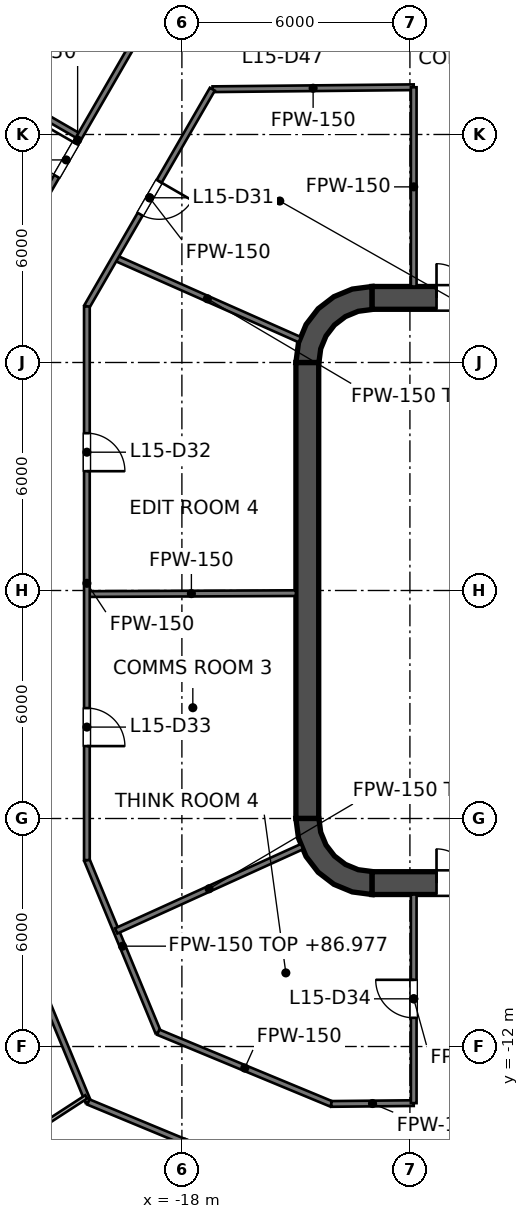
"""IFC4 building model, lengths in metres.
Left out: names, types, materials, properties, quantities, classifications, styles, units other than length and angle.
Written with IfcOpenShell. Run it as: python <this file> out.ifc"""

import sys

from ifc_helpers import new_model, si_unit, direction, frame, frame_2d, origin, place, context, subcontext, project, spatial, polyline, rectangle, outline, extrude, element, fill, save


model = new_model("IFC4")
c1 = context("Model", 3, precision=1e-05, world=origin(), true_north=direction((0.0, 1.0)))
c2 = subcontext(c1, "Body", "Model", "MODEL_VIEW")
j1 = project(units=[si_unit("LENGTHUNIT", "METRE"), si_unit("PLANEANGLEUNIT", "RADIAN")], contexts=[c1])
p1 = place(None, origin())
s1 = spatial("IfcSite", under=j1, at=p1, CompositionType="ELEMENT")
p2 = place(p1, origin())
s2 = spatial("IfcBuilding", under=s1, at=p2, CompositionType="ELEMENT")
p3 = place(p2, frame((0.0, 0.0, 84.0)))
s3 = spatial("IfcBuildingStorey", under=s2, at=p3, CompositionType="ELEMENT", Elevation=84.0)
p4 = place(p3, frame((-13.0, 7.7, 0.0), z_axis=(0.0, 0.0, 1.0), x_axis=(1.0, 0.0, 0.0)))
e1 = element("IfcWall", 1, at=p4, inside=s3, PredefinedType="SHEAR", context=c2, shape_type="SweptSolid", body=[
    extrude(rectangle(XDim=26.0, YDim=0.6, at=frame_2d((13.0, 0.0))), origin(), (0.0, 0.0, 1.0), 4.2),
])
p5 = place(p4, frame((1.7, 0.0, 0.0)))
e2 = element("IfcOpeningElement", 2, at=p5, cuts=e1, PredefinedType="OPENING", context=c2, shape_type="SweptSolid", body=[
    extrude(rectangle(XDim=1.8, YDim=2.1, at=frame_2d((0.9, 1.05))), frame((0.0, 0.3, 0.0), z_axis=(0.0, -1.0, 0.0), x_axis=(1.0, 0.0, 0.0)), (0.0, 0.0, 1.0), 0.6),
])
p6 = place(p4, frame((22.5, 0.0, 0.0)))
e3 = element("IfcOpeningElement", 3, at=p6, cuts=e1, PredefinedType="OPENING", context=c2, shape_type="SweptSolid", body=[
    extrude(rectangle(XDim=1.8, YDim=2.1, at=frame_2d((0.9, 1.05))), frame((0.0, 0.3, 0.0), z_axis=(0.0, -1.0, 0.0), x_axis=(1.0, 0.0, 0.0)), (0.0, 0.0, 1.0), 0.6),
])
p7 = place(p3, frame((-13.0, -7.7, 0.0), z_axis=(0.0, 0.0, 1.0), x_axis=(1.0, 0.0, 0.0)))
e4 = element("IfcWall", 4, at=p7, inside=s3, PredefinedType="SHEAR", context=c2, shape_type="SweptSolid", body=[
    extrude(rectangle(XDim=26.0, YDim=0.6, at=frame_2d((13.0, 0.0))), origin(), (0.0, 0.0, 1.0), 4.2),
])
p8 = place(p7, frame((1.7, 0.0, 0.0)))
e5 = element("IfcOpeningElement", 5, at=p8, cuts=e4, PredefinedType="OPENING", context=c2, shape_type="SweptSolid", body=[
    extrude(rectangle(XDim=1.8, YDim=2.1, at=frame_2d((0.9, 1.05))), frame((0.0, 0.3, 0.0), z_axis=(0.0, -1.0, 0.0), x_axis=(1.0, 0.0, 0.0)), (0.0, 0.0, 1.0), 0.6),
])
p9 = place(p7, frame((22.5, 0.0, 0.0)))
e6 = element("IfcOpeningElement", 6, at=p9, cuts=e4, PredefinedType="OPENING", context=c2, shape_type="SweptSolid", body=[
    extrude(rectangle(XDim=1.8, YDim=2.1, at=frame_2d((0.9, 1.05))), frame((0.0, 0.3, 0.0), z_axis=(0.0, -1.0, 0.0), x_axis=(1.0, 0.0, 0.0)), (0.0, 0.0, 1.0), 0.6),
])
p10 = place(p3, frame((-14.7, -6.0, 0.0), z_axis=(0.0, 0.0, 1.0), x_axis=(0.0, 1.0, 0.0)))
e7 = element("IfcWall", 7, at=p10, inside=s3, PredefinedType="SHEAR", context=c2, shape_type="SweptSolid", body=[
    extrude(rectangle(XDim=12.0, YDim=0.6, at=frame_2d((6.0, 0.0))), origin(), (0.0, 0.0, 1.0), 4.2),
])
p11 = place(p3, origin())
e8 = element("IfcWall", 8, at=p11, inside=s3, PredefinedType="SHEAR", context=c2, shape_type="SweptSolid", body=[
    extrude(outline(polyline([(-15.0, 6.0), (-14.395, 6.0), (-14.347, 6.361), (-14.208, 6.698), (-13.986, 6.986), (-13.698, 7.208), (-13.361, 7.347), (-13.0, 7.395), (-13.0, 8.0), (-13.518, 7.932), (-14.0, 7.732), (-14.414, 7.414), (-14.732, 7.0), (-14.932, 6.518), (-15.0, 6.0)])), origin(), (0.0, 0.0, 1.0), 4.2),
])
e9 = element("IfcWall", 9, at=p11, inside=s3, PredefinedType="SHEAR", context=c2, shape_type="SweptSolid", body=[
    extrude(outline(polyline([(-13.0, -8.0), (-13.0, -7.395), (-13.361, -7.347), (-13.698, -7.208), (-13.986, -6.986), (-14.208, -6.698), (-14.347, -6.361), (-14.395, -6.0), (-15.0, -6.0), (-14.932, -6.518), (-14.732, -7.0), (-14.414, -7.414), (-14.0, -7.732), (-13.518, -7.932), (-13.0, -8.0)])), origin(), (0.0, 0.0, 1.0), 4.2),
])
p12 = place(p3, frame((-11.8, -7.4, 0.0), z_axis=(0.0, 0.0, 1.0), x_axis=(0.0, 1.0, 0.0)))
e10 = element("IfcWall", 10, at=p12, inside=s3, PredefinedType="SOLIDWALL", context=c2, shape_type="SweptSolid", body=[
    extrude(rectangle(XDim=14.8, YDim=0.4, at=frame_2d((7.4, 0.0))), origin(), (0.0, 0.0, 1.0), 4.05),
])
p13 = place(p12, frame((11.2, 0.0, 0.0)))
e11 = element("IfcOpeningElement", 11, at=p13, cuts=e10, PredefinedType="OPENING", context=c2, shape_type="SweptSolid", body=[
    extrude(rectangle(XDim=1.1, YDim=2.1, at=frame_2d((0.55, 1.05))), frame((0.0, 0.2, 0.0), z_axis=(0.0, -1.0, 0.0), x_axis=(1.0, 0.0, 0.0)), (0.0, 0.0, 1.0), 0.4),
])
p14 = place(p12, frame((8.3, 0.0, 0.0)))
e12 = element("IfcOpeningElement", 12, at=p14, cuts=e10, PredefinedType="OPENING", context=c2, shape_type="SweptSolid", body=[
    extrude(rectangle(XDim=1.1, YDim=2.1, at=frame_2d((0.55, 1.05))), frame((0.0, 0.2, 0.0), z_axis=(0.0, -1.0, 0.0), x_axis=(1.0, 0.0, 0.0)), (0.0, 0.0, 1.0), 0.4),
])
p15 = place(p12, frame((5.4, 0.0, 0.0)))
e13 = element("IfcOpeningElement", 13, at=p15, cuts=e10, PredefinedType="OPENING", context=c2, shape_type="SweptSolid", body=[
    extrude(rectangle(XDim=1.1, YDim=2.1, at=frame_2d((0.55, 1.05))), frame((0.0, 0.2, 0.0), z_axis=(0.0, -1.0, 0.0), x_axis=(1.0, 0.0, 0.0)), (0.0, 0.0, 1.0), 0.4),
])
p16 = place(p12, frame((13.552, 0.0, 0.0)))
e14 = element("IfcOpeningElement", 14, at=p16, cuts=e10, PredefinedType="OPENING", context=c2, shape_type="SweptSolid", body=[
    extrude(rectangle(XDim=0.9, YDim=2.1, at=frame_2d((0.45, 1.05))), frame((0.0, 0.2, 0.0), z_axis=(0.0, -1.0, 0.0), x_axis=(1.0, 0.0, 0.0)), (0.0, 0.0, 1.0), 0.4),
])
p17 = place(p12, frame((0.347, 0.0, 0.0)))
e15 = element("IfcOpeningElement", 15, at=p17, cuts=e10, PredefinedType="OPENING", context=c2, shape_type="SweptSolid", body=[
    extrude(rectangle(XDim=0.9, YDim=2.1, at=frame_2d((0.45, 1.05))), frame((0.0, 0.2, 0.0), z_axis=(0.0, -1.0, 0.0), x_axis=(1.0, 0.0, 0.0)), (0.0, 0.0, 1.0), 0.4),
])
e16 = element("IfcWall", 16, at=p11, inside=s3, PredefinedType="SOLIDWALL", context=c2, shape_type="SweptSolid", body=[
    extrude(outline(polyline([(-12.0, -5.925), (-12.0, -5.675), (-14.15, -5.675), (-14.15, -3.025), (-12.0, -3.025), (-12.0, -2.775), (-14.15, -2.775), (-14.15, -0.125), (-12.0, -0.125), (-12.0, 0.125), (-14.15, 0.125), (-14.15, 2.775), (-12.0, 2.775), (-12.0, 3.025), (-14.15, 3.025), (-14.15, 5.675), (-12.0, 5.675), (-12.0, 5.925), (-14.15, 5.925), (-14.4, 5.925), (-14.4, 5.675), (-14.4, 3.025), (-14.4, 2.775), (-14.4, 0.125), (-14.4, -0.125), (-14.4, -2.775), (-14.4, -3.025), (-14.4, -5.675), (-14.4, -5.925), (-14.15, -5.925), (-12.0, -5.925)])), origin(), (0.0, 0.0, 1.0), 4.05),
])
p18 = place(p3, frame((-22.9, -7.572, 0.0), z_axis=(0.0, 0.0, 1.0), x_axis=(0.382367581622, -0.924010298928, 0.0)))
e17 = element("IfcWall", 17, at=p18, inside=s3, PredefinedType="PARTITIONING", context=c2, shape_type="SweptSolid", body=[
    extrude(rectangle(XDim=6.374, YDim=0.15, at=frame_2d((3.187, 0.0))), origin(), (0.0, 0.0, 1.0), 2.977),
])
p19 = place(p18, frame((2.6, 0.0, 0.0)))
e18 = element("IfcOpeningElement", 18, at=p19, cuts=e17, PredefinedType="OPENING", context=c2, shape_type="SweptSolid", body=[
    extrude(rectangle(XDim=1.0, YDim=2.1, at=frame_2d((0.5, 1.05))), frame((0.0, 0.075, 0.0), z_axis=(0.0, -1.0, 0.0), x_axis=(1.0, 0.0, 0.0)), (0.0, 0.0, 1.0), 0.15),
])
p20 = place(p3, frame((-20.5, -7.095, 0.0), z_axis=(0.0, 0.0, 1.0), x_axis=(0.382364990163, -0.924011371303, 0.0)))
e19 = element("IfcWall", 19, at=p20, inside=s3, PredefinedType="PARTITIONING", context=c2, shape_type="SweptSolid", body=[
    extrude(rectangle(XDim=4.902, YDim=0.15, at=frame_2d((2.451, 0.0))), origin(), (0.0, 0.0, 1.0), 2.977),
])
p21 = place(p3, frame((-25.131, 14.509, 0.0), z_axis=(0.0, 0.0, 1.0), x_axis=(0.866037334331, -0.499979335118, 0.0)))
e20 = element("IfcWall", 20, at=p21, inside=s3, PredefinedType="PARTITIONING", context=c2, shape_type="SweptSolid", body=[
    extrude(rectangle(XDim=5.128, YDim=0.15, at=frame_2d((2.564, 0.0))), origin(), (0.0, 0.0, 1.0), 3.045),
])
p22 = place(p3, frame((-19.76, 8.755, 0.0), z_axis=(0.0, 0.0, 1.0), x_axis=(0.91424834547, -0.405154245695, 0.0)))
e21 = element("IfcWall", 21, at=p22, inside=s3, PredefinedType="PARTITIONING", context=c2, shape_type="SweptSolid", body=[
    extrude(rectangle(XDim=5.318, YDim=0.15, at=frame_2d((2.659, 0.0))), origin(), (0.0, 0.0, 1.0), 2.977),
])
p23 = place(p3, frame((-20.46, -13.46, 0.0), z_axis=(0.0, 0.0, 1.0), x_axis=(0.923801547606, -0.382871650349, 0.0)))
e22 = element("IfcWall", 22, at=p23, inside=s3, PredefinedType="PARTITIONING", context=c2, shape_type="SweptSolid", body=[
    extrude(rectangle(XDim=6.415, YDim=0.15, at=frame_2d((3.208, 0.0))), origin(), (0.0, 0.0, 1.0), 2.968),
])
p24 = place(p23, frame((2.707, 0.0, 0.0)))
e23 = element("IfcOpeningElement", 23, at=p24, cuts=e22, PredefinedType="OPENING", context=c2, shape_type="SweptSolid", body=[
    extrude(rectangle(XDim=1.0, YDim=2.1, at=frame_2d((0.5, 1.05))), frame((0.0, 0.075, 0.0), z_axis=(0.0, -1.0, 0.0), x_axis=(1.0, 0.0, 0.0)), (0.0, 0.0, 1.0), 0.15),
])
p25 = place(p3, frame((-18.623, -11.623, 0.0), z_axis=(0.0, 0.0, 1.0), x_axis=(0.923791670587, -0.38289548098, 0.0)))
e24 = element("IfcWall", 24, at=p25, inside=s3, PredefinedType="PARTITIONING", context=c2, shape_type="SweptSolid", body=[
    extrude(rectangle(XDim=4.931, YDim=0.15, at=frame_2d((2.465, 0.0))), origin(), (0.0, 0.0, 1.0), 2.968),
])
p26 = place(p3, frame((-20.5, -0.094, 0.0), z_axis=(0.0, 0.0, 1.0), x_axis=(0.999990148138, 0.004438876723, 0.0)))
e25 = element("IfcWall", 25, at=p26, inside=s3, PredefinedType="PARTITIONING", context=c2, shape_type="SweptSolid", body=[
    extrude(rectangle(XDim=5.5, YDim=0.15, at=frame_2d((2.75, 0.0))), origin(), (0.0, 0.0, 1.0), 2.968),
])
p27 = place(p3, frame((-14.068, -13.511, 0.0), z_axis=(0.0, 0.0, 1.0), x_axis=(0.999950911515, 0.009908307647, 0.0)))
e26 = element("IfcWall", 26, at=p27, inside=s3, PredefinedType="PARTITIONING", context=c2, shape_type="SweptSolid", body=[
    extrude(rectangle(XDim=2.168, YDim=0.15, at=frame_2d((1.084, 0.0))), origin(), (0.0, 0.0, 1.0), 2.968),
])
p28 = place(p3, frame((-17.194, 13.191, 0.0), z_axis=(0.0, 0.0, 1.0), x_axis=(0.999950853109, 0.009914200296, 0.0)))
e27 = element("IfcWall", 27, at=p28, inside=s3, PredefinedType="PARTITIONING", context=c2, shape_type="SweptSolid", body=[
    extrude(rectangle(XDim=5.294, YDim=0.15, at=frame_2d((2.647, 0.0))), origin(), (0.0, 0.0, 1.0), 2.968),
])
p29 = place(p3, frame((-19.728, -8.958, 0.0), z_axis=(0.0, 0.0, 1.0), x_axis=(0.910629511797, 0.413223779863, 0.0)))
e28 = element("IfcWall", 28, at=p29, inside=s3, PredefinedType="PARTITIONING", context=c2, shape_type="SweptSolid", body=[
    extrude(rectangle(XDim=5.368, YDim=0.15, at=frame_2d((2.684, 0.0))), origin(), (0.0, 0.0, 1.0), 3.9),
])
p30 = place(p3, frame((-20.5, 7.474, 0.0), z_axis=(0.0, 0.0, 1.0), x_axis=(0.500012665616, 0.866018091164, 0.0)))
e29 = element("IfcWall", 29, at=p30, inside=s3, PredefinedType="PARTITIONING", context=c2, shape_type="SweptSolid", body=[
    extrude(rectangle(XDim=6.602, YDim=0.15, at=frame_2d((3.301, 0.0))), origin(), (0.0, 0.0, 1.0), 2.968),
])
p31 = place(p30, frame((2.803, 0.0, 0.0)))
e30 = element("IfcOpeningElement", 30, at=p31, cuts=e29, PredefinedType="OPENING", context=c2, shape_type="SweptSolid", body=[
    extrude(rectangle(XDim=1.0, YDim=2.1, at=frame_2d((0.5, 1.05))), frame((0.0, 0.075, 0.0), z_axis=(0.0, -1.0, 0.0), x_axis=(1.0, 0.0, 0.0)), (0.0, 0.0, 1.0), 0.15),
])
p32 = place(p3, frame((-22.9, 8.117, 0.0), z_axis=(0.0, 0.0, 1.0), x_axis=(0.5000050195, 0.866022505755, 0.0)))
e31 = element("IfcWall", 31, at=p32, inside=s3, PredefinedType="PARTITIONING", context=c2, shape_type="SweptSolid", body=[
    extrude(rectangle(XDim=8.626, YDim=0.15, at=frame_2d((4.313, 0.0))), origin(), (0.0, 0.0, 1.0), 2.968),
])
p33 = place(p32, frame((3.211, 0.0, 0.0)))
e32 = element("IfcOpeningElement", 32, at=p33, cuts=e31, PredefinedType="OPENING", context=c2, shape_type="SweptSolid", body=[
    extrude(rectangle(XDim=1.0, YDim=2.1, at=frame_2d((0.5, 1.05))), frame((0.0, 0.075, 0.0), z_axis=(0.0, -1.0, 0.0), x_axis=(1.0, 0.0, 0.0)), (0.0, 0.0, 1.0), 0.15),
])
p34 = place(p3, frame((-11.9, -13.49, 0.0), z_axis=(0.0, 0.0, 1.0), x_axis=(0.0, 1.0, 0.0)))
e33 = element("IfcWall", 33, at=p34, inside=s3, PredefinedType="PARTITIONING", context=c2, shape_type="SweptSolid", body=[
    extrude(rectangle(XDim=5.49, YDim=0.15, at=frame_2d((2.745, 0.0))), origin(), (0.0, 0.0, 1.0), 2.968),
])
p35 = place(p34, frame((2.245, 0.0, 0.0)))
e34 = element("IfcOpeningElement", 34, at=p35, cuts=e33, PredefinedType="OPENING", context=c2, shape_type="SweptSolid", body=[
    extrude(rectangle(XDim=1.0, YDim=2.1, at=frame_2d((0.5, 1.05))), frame((0.0, 0.075, 0.0), z_axis=(0.0, -1.0, 0.0), x_axis=(1.0, 0.0, 0.0)), (0.0, 0.0, 1.0), 0.15),
])
p36 = place(p3, frame((-11.9, 8.0, 0.0), z_axis=(0.0, 0.0, 1.0), x_axis=(0.0, 1.0, 0.0)))
e35 = element("IfcWall", 35, at=p36, inside=s3, PredefinedType="PARTITIONING", context=c2, shape_type="SweptSolid", body=[
    extrude(rectangle(XDim=5.243, YDim=0.15, at=frame_2d((2.622, 0.0))), origin(), (0.0, 0.0, 1.0), 2.968),
])
p37 = place(p3, frame((-20.5, -7.095, 0.0), z_axis=(0.0, 0.0, 1.0), x_axis=(0.0, 1.0, 0.0)))
e36 = element("IfcWall", 36, at=p37, inside=s3, PredefinedType="PARTITIONING", context=c2, shape_type="SweptSolid", body=[
    extrude(rectangle(XDim=14.569, YDim=0.15, at=frame_2d((7.285, 0.0))), origin(), (0.0, 0.0, 1.0), 2.968),
])
p38 = place(p37, frame((10.234, 0.0, 0.0)))
e37 = element("IfcOpeningElement", 37, at=p38, cuts=e36, PredefinedType="OPENING", context=c2, shape_type="SweptSolid", body=[
    extrude(rectangle(XDim=1.0, YDim=2.1, at=frame_2d((0.5, 1.05))), frame((0.0, 0.075, 0.0), z_axis=(0.0, -1.0, 0.0), x_axis=(1.0, 0.0, 0.0)), (0.0, 0.0, 1.0), 0.15),
])
p39 = place(p37, frame((3.0, 0.0, 0.0)))
e38 = element("IfcOpeningElement", 38, at=p39, cuts=e36, PredefinedType="OPENING", context=c2, shape_type="SweptSolid", body=[
    extrude(rectangle(XDim=1.0, YDim=2.1, at=frame_2d((0.5, 1.05))), frame((0.0, 0.075, 0.0), z_axis=(0.0, -1.0, 0.0), x_axis=(1.0, 0.0, 0.0)), (0.0, 0.0, 1.0), 0.15),
])
p40 = place(p3, frame((-23.706, -15.395, 0.0), z_axis=(0.0, 0.0, 1.0), x_axis=(0.838733884708, 0.544541523341, 0.0)))
e39 = element("IfcWall", 39, at=p40, inside=s3, PredefinedType="PARTITIONING", context=c2, shape_type="SweptSolid", body=[
    extrude(rectangle(XDim=3.803, YDim=0.1, at=frame_2d((1.902, 0.0))), origin(), (0.0, 0.0, 1.0), 3.9),
])
p41 = place(p13, origin())
e40 = element("IfcDoor", 40, at=p41, inside=s3, OperationType="DOUBLE_DOOR_SLIDING", PredefinedType="DOOR", context=c2, shape_type="SweptSolid", body=[
    extrude(rectangle(XDim=1.1, YDim=2.1, at=frame_2d((0.55, 1.05))), frame((0.0, 0.025, 0.0), z_axis=(0.0, -1.0, 0.0), x_axis=(1.0, 0.0, 0.0)), (0.0, 0.0, 1.0), 0.05),
])
fill(e11, e40)
p42 = place(p14, origin())
e41 = element("IfcDoor", 41, at=p42, inside=s3, OperationType="DOUBLE_DOOR_SLIDING", PredefinedType="DOOR", context=c2, shape_type="SweptSolid", body=[
    extrude(rectangle(XDim=1.1, YDim=2.1, at=frame_2d((0.55, 1.05))), frame((0.0, 0.025, 0.0), z_axis=(0.0, -1.0, 0.0), x_axis=(1.0, 0.0, 0.0)), (0.0, 0.0, 1.0), 0.05),
])
fill(e12, e41)
p43 = place(p15, origin())
e42 = element("IfcDoor", 42, at=p43, inside=s3, OperationType="DOUBLE_DOOR_SLIDING", PredefinedType="DOOR", context=c2, shape_type="SweptSolid", body=[
    extrude(rectangle(XDim=1.1, YDim=2.1, at=frame_2d((0.55, 1.05))), frame((0.0, 0.025, 0.0), z_axis=(0.0, -1.0, 0.0), x_axis=(1.0, 0.0, 0.0)), (0.0, 0.0, 1.0), 0.05),
])
fill(e13, e42)
p44 = place(p16, origin())
e43 = element("IfcDoor", 43, at=p44, inside=s3, OperationType="SINGLE_SWING_LEFT", PredefinedType="DOOR", context=c2, shape_type="SweptSolid", body=[
    extrude(rectangle(XDim=0.9, YDim=2.1, at=frame_2d((0.45, 1.05))), frame((0.0, 0.025, 0.0), z_axis=(0.0, -1.0, 0.0), x_axis=(1.0, 0.0, 0.0)), (0.0, 0.0, 1.0), 0.05),
])
fill(e14, e43)
p45 = place(p17, origin())
e44 = element("IfcDoor", 44, at=p45, inside=s3, OperationType="SINGLE_SWING_LEFT", PredefinedType="DOOR", context=c2, shape_type="SweptSolid", body=[
    extrude(rectangle(XDim=0.9, YDim=2.1, at=frame_2d((0.45, 1.05))), frame((0.0, 0.025, 0.0), z_axis=(0.0, -1.0, 0.0), x_axis=(1.0, 0.0, 0.0)), (0.0, 0.0, 1.0), 0.05),
])
fill(e15, e44)
p46 = place(p5, origin())
e45 = element("IfcDoor", 45, at=p46, inside=s3, OperationType="DOUBLE_DOOR_SINGLE_SWING", PredefinedType="DOOR", context=c2, shape_type="SweptSolid", body=[
    extrude(rectangle(XDim=1.8, YDim=2.1, at=frame_2d((0.9, 1.05))), frame((0.0, 0.025, 0.0), z_axis=(0.0, -1.0, 0.0), x_axis=(1.0, 0.0, 0.0)), (0.0, 0.0, 1.0), 0.05),
])
fill(e2, e45)
p47 = place(p8, origin())
e46 = element("IfcDoor", 46, at=p47, inside=s3, OperationType="DOUBLE_DOOR_SINGLE_SWING", PredefinedType="DOOR", context=c2, shape_type="SweptSolid", body=[
    extrude(rectangle(XDim=1.8, YDim=2.1, at=frame_2d((0.9, 1.05))), frame((0.0, 0.025, 0.0), z_axis=(0.0, -1.0, 0.0), x_axis=(1.0, 0.0, 0.0)), (0.0, 0.0, 1.0), 0.05),
])
fill(e5, e46)
p48 = place(p31, origin())
e47 = element("IfcDoor", 47, at=p48, inside=s3, OperationType="SINGLE_SWING_RIGHT", PredefinedType="DOOR", context=c2, shape_type="SweptSolid", body=[
    extrude(rectangle(XDim=1.0, YDim=2.1, at=frame_2d((0.5, 1.05))), frame((0.0, 0.025, 0.0), z_axis=(0.0, -1.0, 0.0), x_axis=(1.0, 0.0, 0.0)), (0.0, 0.0, 1.0), 0.05),
])
fill(e30, e47)
p49 = place(p38, origin())
e48 = element("IfcDoor", 48, at=p49, inside=s3, OperationType="SINGLE_SWING_LEFT", PredefinedType="DOOR", context=c2, shape_type="SweptSolid", body=[
    extrude(rectangle(XDim=1.0, YDim=2.1, at=frame_2d((0.5, 1.05))), frame((0.0, 0.025, 0.0), z_axis=(0.0, -1.0, 0.0), x_axis=(1.0, 0.0, 0.0)), (0.0, 0.0, 1.0), 0.05),
])
fill(e37, e48)
p50 = place(p39, origin())
e49 = element("IfcDoor", 49, at=p50, inside=s3, OperationType="SINGLE_SWING_LEFT", PredefinedType="DOOR", context=c2, shape_type="SweptSolid", body=[
    extrude(rectangle(XDim=1.0, YDim=2.1, at=frame_2d((0.5, 1.05))), frame((0.0, 0.025, 0.0), z_axis=(0.0, -1.0, 0.0), x_axis=(1.0, 0.0, 0.0)), (0.0, 0.0, 1.0), 0.05),
])
fill(e38, e49)
p51 = place(p35, origin())
e50 = element("IfcDoor", 50, at=p51, inside=s3, OperationType="SINGLE_SWING_RIGHT", PredefinedType="DOOR", context=c2, shape_type="SweptSolid", body=[
    extrude(rectangle(XDim=1.0, YDim=2.1, at=frame_2d((0.5, 1.05))), frame((0.0, 0.025, 0.0), z_axis=(0.0, -1.0, 0.0), x_axis=(1.0, 0.0, 0.0)), (0.0, 0.0, 1.0), 0.05),
])
fill(e34, e50)
p52 = place(p33, origin())
e51 = element("IfcDoor", 51, at=p52, inside=s3, OperationType="SINGLE_SWING_RIGHT", PredefinedType="DOOR", context=c2, shape_type="SweptSolid", body=[
    extrude(rectangle(XDim=1.0, YDim=2.1, at=frame_2d((0.5, 1.05))), frame((0.0, 0.025, 0.0), z_axis=(0.0, -1.0, 0.0), x_axis=(1.0, 0.0, 0.0)), (0.0, 0.0, 1.0), 0.05),
])
fill(e32, e51)
save(model, sys.argv[1])
